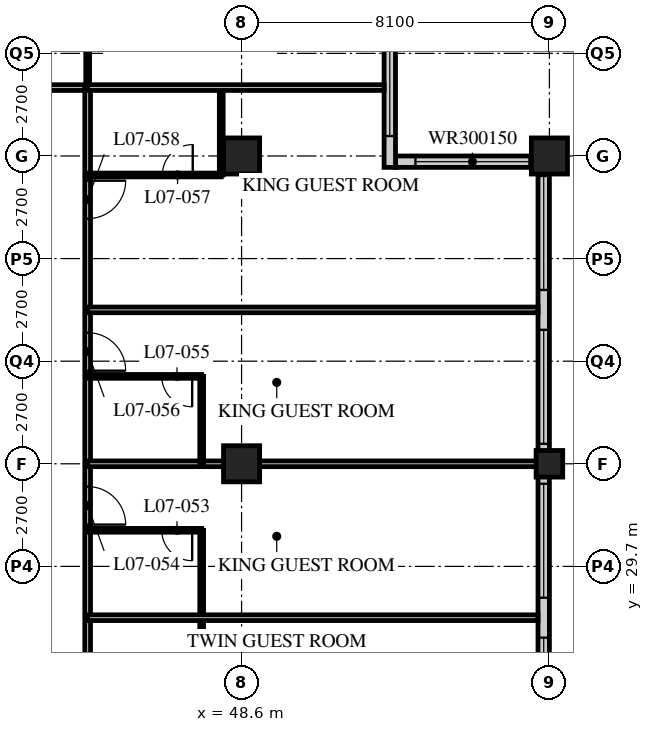
"""IFC4 building model, lengths in metres.
Left out: names, types, materials, properties, quantities, classifications, styles, units other than length and angle.
Written with IfcOpenShell. Run it as: python <this file> out.ifc"""

import sys

from ifc_helpers import new_model, si_unit, direction, frame, frame_2d, origin, origin_2d, place, context, subcontext, project, spatial, rectangle, hollow_rectangle, extrude, element, fill, save


model = new_model("IFC4")
c1 = context("Model", 3, precision=1e-05, world=origin(), true_north=direction((0.0, 1.0)))
c2 = subcontext(c1, "Body", "Model", "MODEL_VIEW")
j1 = project(units=[si_unit("LENGTHUNIT", "METRE"), si_unit("PLANEANGLEUNIT", "RADIAN")], contexts=[c1])
p1 = place(None, origin())
s1 = spatial("IfcSite", under=j1, at=p1, CompositionType="ELEMENT")
p2 = place(p1, origin())
s2 = spatial("IfcBuilding", under=s1, at=p2, CompositionType="ELEMENT")
p3 = place(p2, frame((0.0, 0.0, 36.4)))
s3 = spatial("IfcBuildingStorey", under=s2, at=p3, CompositionType="ELEMENT", Elevation=36.4)
for number, where, z_axis, x_axis in (
    (1, (48.6, 32.4, 0.0), (0.0, 0.0, 1.0), (1.0, 0.0, 0.0)),
    (2, (48.6, 40.5, 0.0), (0.0, 0.0, 1.0), (1.0, 0.0, 0.0)),
):
    element("IfcColumn", number, at=place(p3, frame(where, z_axis=z_axis, x_axis=x_axis)), inside=s3, PredefinedType="COLUMN", context=c2, shape_type="SweptSolid", body=[
        extrude(hollow_rectangle(XDim=0.95, YDim=0.95, WallThickness=0.095, at=origin_2d()), origin(), (0.0, 0.0, 1.0), 3.4),
    ])
p4 = place(p3, frame((56.7, 32.4, 0.0), z_axis=(0.0, 0.0, 1.0), x_axis=(1.0, 0.0, 0.0)))
e3 = element("IfcColumn", 3, at=p4, inside=s3, PredefinedType="COLUMN", context=c2, shape_type="SweptSolid", body=[
    extrude(hollow_rectangle(XDim=0.7, YDim=0.7, WallThickness=0.06, at=origin_2d()), origin(), (0.0, 0.0, 1.0), 3.4),
])
p5 = place(p3, frame((56.7, 40.5, 0.0), z_axis=(0.0, 0.0, 1.0), x_axis=(1.0, 0.0, 0.0)))
e4 = element("IfcColumn", 4, at=p5, inside=s3, PredefinedType="COLUMN", context=c2, shape_type="SweptSolid", body=[
    extrude(hollow_rectangle(XDim=0.95, YDim=0.95, WallThickness=0.095, at=origin_2d()), origin(), (0.0, 0.0, 1.0), 3.4),
])
p6 = place(p3, frame((56.55, 8.4, 0.0), z_axis=(0.0, 0.0, 1.0), x_axis=(0.0, 1.0, 0.0)))
e5 = element("IfcWall", 5, at=p6, inside=s3, PredefinedType="SOLIDWALL", context=c2, shape_type="SweptSolid", body=[
    extrude(rectangle(XDim=32.1, YDim=0.3, at=frame_2d((16.05, 0.0))), origin(), (0.0, 0.0, 1.0), 3.19),
])
p7 = place(p6, frame((0.225, 0.0, 0.9)))
e6 = element("IfcOpeningElement", 6, at=p7, cuts=e5, PredefinedType="OPENING", context=c2, shape_type="SweptSolid", body=[
    extrude(rectangle(XDim=3.0, YDim=2.0, at=frame_2d((1.5, 1.0))), frame((0.0, 0.16, 0.0), z_axis=(0.0, -1.0, 0.0), x_axis=(1.0, 0.0, 0.0)), (0.0, 0.0, 1.0), 0.32),
])
p8 = place(p6, frame((4.275, 0.0, 0.9)))
e7 = element("IfcOpeningElement", 7, at=p8, cuts=e5, PredefinedType="OPENING", context=c2, shape_type="SweptSolid", body=[
    extrude(rectangle(XDim=3.0, YDim=2.0, at=frame_2d((1.5, 1.0))), frame((0.0, 0.16, 0.0), z_axis=(0.0, -1.0, 0.0), x_axis=(1.0, 0.0, 0.0)), (0.0, 0.0, 1.0), 0.32),
])
p9 = place(p6, frame((8.325, 0.0, 0.9)))
e8 = element("IfcOpeningElement", 8, at=p9, cuts=e5, PredefinedType="OPENING", context=c2, shape_type="SweptSolid", body=[
    extrude(rectangle(XDim=3.0, YDim=2.0, at=frame_2d((1.5, 1.0))), frame((0.0, 0.16, 0.0), z_axis=(0.0, -1.0, 0.0), x_axis=(1.0, 0.0, 0.0)), (0.0, 0.0, 1.0), 0.32),
])
p10 = place(p6, frame((12.375, 0.0, 0.9)))
e9 = element("IfcOpeningElement", 9, at=p10, cuts=e5, PredefinedType="OPENING", context=c2, shape_type="SweptSolid", body=[
    extrude(rectangle(XDim=3.0, YDim=2.0, at=frame_2d((1.5, 1.0))), frame((0.0, 0.16, 0.0), z_axis=(0.0, -1.0, 0.0), x_axis=(1.0, 0.0, 0.0)), (0.0, 0.0, 1.0), 0.32),
])
p11 = place(p6, frame((16.425, 0.0, 0.9)))
e10 = element("IfcOpeningElement", 10, at=p11, cuts=e5, PredefinedType="OPENING", context=c2, shape_type="SweptSolid", body=[
    extrude(rectangle(XDim=3.0, YDim=2.0, at=frame_2d((1.5, 1.0))), frame((0.0, 0.16, 0.0), z_axis=(0.0, -1.0, 0.0), x_axis=(1.0, 0.0, 0.0)), (0.0, 0.0, 1.0), 0.32),
])
p12 = place(p6, frame((20.475, 0.0, 0.9)))
e11 = element("IfcOpeningElement", 11, at=p12, cuts=e5, PredefinedType="OPENING", context=c2, shape_type="SweptSolid", body=[
    extrude(rectangle(XDim=3.0, YDim=2.0, at=frame_2d((1.5, 1.0))), frame((0.0, 0.16, 0.0), z_axis=(0.0, -1.0, 0.0), x_axis=(1.0, 0.0, 0.0)), (0.0, 0.0, 1.0), 0.32),
])
p13 = place(p6, frame((24.525, 0.0, 0.9)))
e12 = element("IfcOpeningElement", 12, at=p13, cuts=e5, PredefinedType="OPENING", context=c2, shape_type="SweptSolid", body=[
    extrude(rectangle(XDim=3.0, YDim=2.0, at=frame_2d((1.5, 1.0))), frame((0.0, 0.16, 0.0), z_axis=(0.0, -1.0, 0.0), x_axis=(1.0, 0.0, 0.0)), (0.0, 0.0, 1.0), 0.32),
])
p14 = place(p6, frame((28.575, 0.0, 0.9)))
e13 = element("IfcOpeningElement", 13, at=p14, cuts=e5, PredefinedType="OPENING", context=c2, shape_type="SweptSolid", body=[
    extrude(rectangle(XDim=3.0, YDim=2.0, at=frame_2d((1.5, 1.0))), frame((0.0, 0.16, 0.0), z_axis=(0.0, -1.0, 0.0), x_axis=(1.0, 0.0, 0.0)), (0.0, 0.0, 1.0), 0.32),
])
p15 = place(p3, frame((56.4, 40.35, 0.0), z_axis=(0.0, 0.0, 1.0), x_axis=(-1.0, 0.0, 0.0)))
e14 = element("IfcWall", 14, at=p15, inside=s3, PredefinedType="SOLIDWALL", context=c2, shape_type="SweptSolid", body=[
    extrude(rectangle(XDim=3.75, YDim=0.3, at=frame_2d((1.875, 0.0))), origin(), (0.0, 0.0, 1.0), 3.19),
])
p16 = place(p15, frame((0.225, 0.0, 0.9)))
e15 = element("IfcOpeningElement", 15, at=p16, cuts=e14, PredefinedType="OPENING", context=c2, shape_type="SweptSolid", body=[
    extrude(rectangle(XDim=3.0, YDim=1.5, at=frame_2d((1.5, 0.75))), frame((0.0, 0.16, 0.0), z_axis=(0.0, -1.0, 0.0), x_axis=(1.0, 0.0, 0.0)), (0.0, 0.0, 1.0), 0.32),
])
p17 = place(p3, frame((52.5, 40.2, 0.0), z_axis=(0.0, 0.0, 1.0), x_axis=(0.0, 1.0, 0.0)))
e16 = element("IfcWall", 16, at=p17, inside=s3, PredefinedType="SOLIDWALL", context=c2, shape_type="SweptSolid", body=[
    extrude(rectangle(XDim=4.35, YDim=0.3, at=frame_2d((2.175, 0.0))), origin(), (0.0, 0.0, 1.0), 3.19),
])
p18 = place(p17, frame((0.825, 0.0, 0.9)))
e17 = element("IfcOpeningElement", 17, at=p18, cuts=e16, PredefinedType="OPENING", context=c2, shape_type="SweptSolid", body=[
    extrude(rectangle(XDim=3.0, YDim=1.5, at=frame_2d((1.5, 0.75))), frame((0.0, 0.16, 0.0), z_axis=(0.0, -1.0, 0.0), x_axis=(1.0, 0.0, 0.0)), (0.0, 0.0, 1.0), 0.32),
])
p19 = place(p3, frame((12.15, 42.3, 0.0), z_axis=(0.0, 0.0, 1.0), x_axis=(1.0, 0.0, 0.0)))
e18 = element("IfcWall", 18, at=p19, inside=s3, PredefinedType="PARTITIONING", context=c2, shape_type="SweptSolid", body=[
    extrude(rectangle(XDim=32.4, YDim=0.15, at=frame_2d((16.2, 0.0))), origin(), (0.0, 0.0, 1.0), 3.19),
])
p20 = place(p19, frame((6.5, 0.0, 0.0)))
e19 = element("IfcOpeningElement", 19, at=p20, cuts=e18, PredefinedType="OPENING", context=c2, shape_type="SweptSolid", body=[
    extrude(rectangle(XDim=1.0, YDim=2.1, at=frame_2d((0.5, 1.05))), frame((0.0, 0.085, 0.0), z_axis=(0.0, -1.0, 0.0), x_axis=(1.0, 0.0, 0.0)), (0.0, 0.0, 1.0), 0.17),
])
p21 = place(p19, frame((8.4, 0.0, 0.0)))
e20 = element("IfcOpeningElement", 20, at=p21, cuts=e18, PredefinedType="OPENING", context=c2, shape_type="SweptSolid", body=[
    extrude(rectangle(XDim=1.0, YDim=2.1, at=frame_2d((0.5, 1.05))), frame((0.0, 0.085, 0.0), z_axis=(0.0, -1.0, 0.0), x_axis=(1.0, 0.0, 0.0)), (0.0, 0.0, 1.0), 0.17),
])
p22 = place(p19, frame((14.6, 0.0, 0.0)))
e21 = element("IfcOpeningElement", 21, at=p22, cuts=e18, PredefinedType="OPENING", context=c2, shape_type="SweptSolid", body=[
    extrude(rectangle(XDim=1.0, YDim=2.1, at=frame_2d((0.5, 1.05))), frame((0.0, 0.085, 0.0), z_axis=(0.0, -1.0, 0.0), x_axis=(1.0, 0.0, 0.0)), (0.0, 0.0, 1.0), 0.17),
])
p23 = place(p19, frame((18.65, 0.0, 0.0)))
e22 = element("IfcOpeningElement", 22, at=p23, cuts=e18, PredefinedType="OPENING", context=c2, shape_type="SweptSolid", body=[
    extrude(rectangle(XDim=1.0, YDim=2.1, at=frame_2d((0.5, 1.05))), frame((0.0, 0.085, 0.0), z_axis=(0.0, -1.0, 0.0), x_axis=(1.0, 0.0, 0.0)), (0.0, 0.0, 1.0), 0.17),
])
p24 = place(p19, frame((23.0, 0.0, 0.0)))
e23 = element("IfcOpeningElement", 23, at=p24, cuts=e18, PredefinedType="OPENING", context=c2, shape_type="SweptSolid", body=[
    extrude(rectangle(XDim=1.0, YDim=2.1, at=frame_2d((0.5, 1.05))), frame((0.0, 0.085, 0.0), z_axis=(0.0, -1.0, 0.0), x_axis=(1.0, 0.0, 0.0)), (0.0, 0.0, 1.0), 0.17),
])
p25 = place(p19, frame((26.75, 0.0, 0.0)))
e24 = element("IfcOpeningElement", 24, at=p25, cuts=e18, PredefinedType="OPENING", context=c2, shape_type="SweptSolid", body=[
    extrude(rectangle(XDim=1.0, YDim=2.1, at=frame_2d((0.5, 1.05))), frame((0.0, 0.085, 0.0), z_axis=(0.0, -1.0, 0.0), x_axis=(1.0, 0.0, 0.0)), (0.0, 0.0, 1.0), 0.17),
])
p26 = place(p19, frame((28.775, 0.0, 0.0)))
e25 = element("IfcOpeningElement", 25, at=p26, cuts=e18, PredefinedType="OPENING", context=c2, shape_type="SweptSolid", body=[
    extrude(rectangle(XDim=1.0, YDim=2.1, at=frame_2d((0.5, 1.05))), frame((0.0, 0.085, 0.0), z_axis=(0.0, -1.0, 0.0), x_axis=(1.0, 0.0, 0.0)), (0.0, 0.0, 1.0), 0.17),
])
p27 = place(p19, frame((2.625, 0.0, 0.0)))
e26 = element("IfcOpeningElement", 26, at=p27, cuts=e18, PredefinedType="OPENING", context=c2, shape_type="SweptSolid", body=[
    extrude(rectangle(XDim=1.0, YDim=2.1, at=frame_2d((0.5, 1.05))), frame((0.0, 0.085, 0.0), z_axis=(0.0, -1.0, 0.0), x_axis=(1.0, 0.0, 0.0)), (0.0, 0.0, 1.0), 0.17),
])
p28 = place(p3, frame((44.55, 16.2, 0.0), z_axis=(0.0, 0.0, 1.0), x_axis=(0.0, 1.0, 0.0)))
e27 = element("IfcWall", 27, at=p28, inside=s3, PredefinedType="PARTITIONING", context=c2, shape_type="SweptSolid", body=[
    extrude(rectangle(XDim=26.1, YDim=0.15, at=frame_2d((13.05, 0.0))), origin(), (0.0, 0.0, 1.0), 3.19),
])
p29 = place(p28, frame((2.75, 0.0, 0.0)))
e28 = element("IfcOpeningElement", 28, at=p29, cuts=e27, PredefinedType="OPENING", context=c2, shape_type="SweptSolid", body=[
    extrude(rectangle(XDim=1.0, YDim=2.1, at=frame_2d((0.5, 1.05))), frame((0.0, 0.085, 0.0), z_axis=(0.0, -1.0, 0.0), x_axis=(1.0, 0.0, 0.0)), (0.0, 0.0, 1.0), 0.17),
])
p30 = place(p28, frame((4.35, 0.0, 0.0)))
e29 = element("IfcOpeningElement", 29, at=p30, cuts=e27, PredefinedType="OPENING", context=c2, shape_type="SweptSolid", body=[
    extrude(rectangle(XDim=1.0, YDim=2.1, at=frame_2d((0.5, 1.05))), frame((0.0, 0.085, 0.0), z_axis=(0.0, -1.0, 0.0), x_axis=(1.0, 0.0, 0.0)), (0.0, 0.0, 1.0), 0.17),
])
p31 = place(p28, frame((8.4, 0.0, 0.0)))
e30 = element("IfcOpeningElement", 30, at=p31, cuts=e27, PredefinedType="OPENING", context=c2, shape_type="SweptSolid", body=[
    extrude(rectangle(XDim=1.0, YDim=2.1, at=frame_2d((0.5, 1.05))), frame((0.0, 0.085, 0.0), z_axis=(0.0, -1.0, 0.0), x_axis=(1.0, 0.0, 0.0)), (0.0, 0.0, 1.0), 0.17),
])
p32 = place(p28, frame((14.6, 0.0, 0.0)))
e31 = element("IfcOpeningElement", 31, at=p32, cuts=e27, PredefinedType="OPENING", context=c2, shape_type="SweptSolid", body=[
    extrude(rectangle(XDim=1.0, YDim=2.1, at=frame_2d((0.5, 1.05))), frame((0.0, 0.085, 0.0), z_axis=(0.0, -1.0, 0.0), x_axis=(1.0, 0.0, 0.0)), (0.0, 0.0, 1.0), 0.17),
])
p33 = place(p28, frame((18.65, 0.0, 0.0)))
e32 = element("IfcOpeningElement", 32, at=p33, cuts=e27, PredefinedType="OPENING", context=c2, shape_type="SweptSolid", body=[
    extrude(rectangle(XDim=1.0, YDim=2.1, at=frame_2d((0.5, 1.05))), frame((0.0, 0.085, 0.0), z_axis=(0.0, -1.0, 0.0), x_axis=(1.0, 0.0, 0.0)), (0.0, 0.0, 1.0), 0.17),
])
p34 = place(p28, frame((22.65, 0.0, 0.0)))
e33 = element("IfcOpeningElement", 33, at=p34, cuts=e27, PredefinedType="OPENING", context=c2, shape_type="SweptSolid", body=[
    extrude(rectangle(XDim=1.0, YDim=2.1, at=frame_2d((0.5, 1.05))), frame((0.0, 0.085, 0.0), z_axis=(0.0, -1.0, 0.0), x_axis=(1.0, 0.0, 0.0)), (0.0, 0.0, 1.0), 0.17),
])
p35 = place(p3, frame((47.55, 25.75, 0.0), z_axis=(0.0, 0.0, 1.0), x_axis=(0.0, 1.0, 0.0)))
e34 = element("IfcWall", 34, at=p35, inside=s3, PredefinedType="PARTITIONING", context=c2, shape_type="SweptSolid", body=[
    extrude(rectangle(XDim=4.9, YDim=0.1, at=frame_2d((2.45, 0.0))), origin(), (0.0, 0.0, 1.0), 3.19),
])
p36 = place(p3, frame((44.55, 28.35, 0.0), z_axis=(0.0, 0.0, 1.0), x_axis=(1.0, 0.0, 0.0)))
e35 = element("IfcWall", 35, at=p36, inside=s3, PredefinedType="PARTITIONING", context=c2, shape_type="SweptSolid", body=[
    extrude(rectangle(XDim=11.85, YDim=0.15, at=frame_2d((5.925, 0.0))), origin(), (0.0, 0.0, 1.0), 3.19),
])
p37 = place(p3, frame((44.55, 30.65, 0.0), z_axis=(0.0, 0.0, 1.0), x_axis=(1.0, 0.0, 0.0)))
e36 = element("IfcWall", 36, at=p37, inside=s3, PredefinedType="PARTITIONING", context=c2, shape_type="SweptSolid", body=[
    extrude(rectangle(XDim=3.0, YDim=0.1, at=frame_2d((1.5, 0.0))), origin(), (0.0, 0.0, 1.0), 3.19),
])
p38 = place(p37, frame((1.95, 0.0, 0.0)))
e37 = element("IfcOpeningElement", 37, at=p38, cuts=e36, PredefinedType="OPENING", context=c2, shape_type="SweptSolid", body=[
    extrude(rectangle(XDim=0.8, YDim=2.1, at=frame_2d((0.4, 1.05))), frame((0.0, 0.06, 0.0), z_axis=(0.0, -1.0, 0.0), x_axis=(1.0, 0.0, 0.0)), (0.0, 0.0, 1.0), 0.12),
])
p39 = place(p3, frame((44.55, 32.4, 0.0), z_axis=(0.0, 0.0, 1.0), x_axis=(1.0, 0.0, 0.0)))
e38 = element("IfcWall", 38, at=p39, inside=s3, PredefinedType="PARTITIONING", context=c2, shape_type="SweptSolid", body=[
    extrude(rectangle(XDim=11.85, YDim=0.15, at=frame_2d((5.925, 0.0))), origin(), (0.0, 0.0, 1.0), 2.578),
])
p40 = place(p3, frame((47.55, 32.4, 0.0), z_axis=(0.0, 0.0, 1.0), x_axis=(0.0, 1.0, 0.0)))
e39 = element("IfcWall", 39, at=p40, inside=s3, PredefinedType="PARTITIONING", context=c2, shape_type="SweptSolid", body=[
    extrude(rectangle(XDim=2.3, YDim=0.1, at=frame_2d((1.15, 0.0))), origin(), (0.0, 0.0, 1.0), 3.19),
])
p41 = place(p3, frame((44.55, 34.7, 0.0), z_axis=(0.0, 0.0, 1.0), x_axis=(1.0, 0.0, 0.0)))
e40 = element("IfcWall", 40, at=p41, inside=s3, PredefinedType="PARTITIONING", context=c2, shape_type="SweptSolid", body=[
    extrude(rectangle(XDim=3.0, YDim=0.1, at=frame_2d((1.5, 0.0))), origin(), (0.0, 0.0, 1.0), 3.19),
])
p42 = place(p41, frame((1.95, 0.0, 0.0)))
e41 = element("IfcOpeningElement", 41, at=p42, cuts=e40, PredefinedType="OPENING", context=c2, shape_type="SweptSolid", body=[
    extrude(rectangle(XDim=0.8, YDim=2.1, at=frame_2d((0.4, 1.05))), frame((0.0, 0.06, 0.0), z_axis=(0.0, -1.0, 0.0), x_axis=(1.0, 0.0, 0.0)), (0.0, 0.0, 1.0), 0.12),
])
p43 = place(p3, frame((44.55, 36.45, 0.0), z_axis=(0.0, 0.0, 1.0), x_axis=(1.0, 0.0, 0.0)))
e42 = element("IfcWall", 42, at=p43, inside=s3, PredefinedType="PARTITIONING", context=c2, shape_type="SweptSolid", body=[
    extrude(rectangle(XDim=11.85, YDim=0.15, at=frame_2d((5.925, 0.0))), origin(), (0.0, 0.0, 1.0), 3.19),
])
p44 = place(p3, frame((48.065, 40.0, 0.0), z_axis=(0.0, 0.0, 1.0), x_axis=(0.0, 1.0, 0.0)))
e43 = element("IfcWall", 43, at=p44, inside=s3, PredefinedType="PARTITIONING", context=c2, shape_type="SweptSolid", body=[
    extrude(rectangle(XDim=2.3, YDim=0.1, at=frame_2d((1.15, 0.0))), origin(), (0.0, 0.0, 1.0), 3.19),
])
p45 = place(p3, frame((44.55, 40.0, 0.0), z_axis=(0.0, 0.0, 1.0), x_axis=(1.0, 0.0, 0.0)))
e44 = element("IfcWall", 44, at=p45, inside=s3, PredefinedType="PARTITIONING", context=c2, shape_type="SweptSolid", body=[
    extrude(rectangle(XDim=3.515, YDim=0.1, at=frame_2d((1.757, 0.0))), origin(), (0.0, 0.0, 1.0), 3.19),
])
p46 = place(p45, frame((1.965, 0.0, 0.0)))
e45 = element("IfcOpeningElement", 45, at=p46, cuts=e44, PredefinedType="OPENING", context=c2, shape_type="SweptSolid", body=[
    extrude(rectangle(XDim=0.8, YDim=2.1, at=frame_2d((0.4, 1.05))), frame((0.0, 0.06, 0.0), z_axis=(0.0, -1.0, 0.0), x_axis=(1.0, 0.0, 0.0)), (0.0, 0.0, 1.0), 0.12),
])
p47 = place(p3, frame((44.55, 42.3, 0.0), z_axis=(0.0, 0.0, 1.0), x_axis=(0.0, 1.0, 0.0)))
e46 = element("IfcWall", 46, at=p47, inside=s3, PredefinedType="PARTITIONING", context=c2, shape_type="SweptSolid", body=[
    extrude(rectangle(XDim=2.4, YDim=0.1, at=frame_2d((1.2, 0.0))), origin(), (0.0, 0.0, 1.0), 3.19),
])
p48 = place(p3, frame((44.55, 42.3, 0.0), z_axis=(0.0, 0.0, 1.0), x_axis=(1.0, 0.0, 0.0)))
e47 = element("IfcWall", 47, at=p48, inside=s3, PredefinedType="PARTITIONING", context=c2, shape_type="SweptSolid", body=[
    extrude(rectangle(XDim=7.8, YDim=0.15, at=frame_2d((3.9, 0.0))), origin(), (0.0, 0.0, 1.0), 3.19),
])
p49 = place(p11, origin())
e48 = element("IfcWindow", 48, at=p49, inside=s3, PartitioningType="SINGLE_PANEL", PredefinedType="WINDOW", context=c2, shape_type="SweptSolid", body=[
    extrude(rectangle(XDim=3.0, YDim=2.0, at=frame_2d((1.5, 1.0))), frame((0.0, 0.03, 0.0), z_axis=(0.0, -1.0, 0.0), x_axis=(1.0, 0.0, 0.0)), (0.0, 0.0, 1.0), 0.06),
])
fill(e10, e48)
p50 = place(p12, origin())
e49 = element("IfcWindow", 49, at=p50, inside=s3, PartitioningType="SINGLE_PANEL", PredefinedType="WINDOW", context=c2, shape_type="SweptSolid", body=[
    extrude(rectangle(XDim=3.0, YDim=2.0, at=frame_2d((1.5, 1.0))), frame((0.0, 0.03, 0.0), z_axis=(0.0, -1.0, 0.0), x_axis=(1.0, 0.0, 0.0)), (0.0, 0.0, 1.0), 0.06),
])
fill(e11, e49)
p51 = place(p13, origin())
e50 = element("IfcWindow", 50, at=p51, inside=s3, PartitioningType="SINGLE_PANEL", PredefinedType="WINDOW", context=c2, shape_type="SweptSolid", body=[
    extrude(rectangle(XDim=3.0, YDim=2.0, at=frame_2d((1.5, 1.0))), frame((0.0, 0.03, 0.0), z_axis=(0.0, -1.0, 0.0), x_axis=(1.0, 0.0, 0.0)), (0.0, 0.0, 1.0), 0.06),
])
fill(e12, e50)
p52 = place(p14, origin())
e51 = element("IfcWindow", 51, at=p52, inside=s3, PartitioningType="SINGLE_PANEL", PredefinedType="WINDOW", context=c2, shape_type="SweptSolid", body=[
    extrude(rectangle(XDim=3.0, YDim=2.0, at=frame_2d((1.5, 1.0))), frame((0.0, 0.03, 0.0), z_axis=(0.0, -1.0, 0.0), x_axis=(1.0, 0.0, 0.0)), (0.0, 0.0, 1.0), 0.06),
])
fill(e13, e51)
p53 = place(p16, origin())
e52 = element("IfcWindow", 52, at=p53, inside=s3, PartitioningType="SINGLE_PANEL", PredefinedType="WINDOW", context=c2, shape_type="SweptSolid", body=[
    extrude(rectangle(XDim=3.0, YDim=1.5, at=frame_2d((1.5, 0.75))), frame((0.0, 0.03, 0.0), z_axis=(0.0, -1.0, 0.0), x_axis=(1.0, 0.0, 0.0)), (0.0, 0.0, 1.0), 0.06),
])
fill(e15, e52)
p54 = place(p18, origin())
e53 = element("IfcWindow", 53, at=p54, inside=s3, PartitioningType="SINGLE_PANEL", PredefinedType="WINDOW", context=c2, shape_type="SweptSolid", body=[
    extrude(rectangle(XDim=3.0, YDim=1.5, at=frame_2d((1.5, 0.75))), frame((0.0, 0.03, 0.0), z_axis=(0.0, -1.0, 0.0), x_axis=(1.0, 0.0, 0.0)), (0.0, 0.0, 1.0), 0.06),
])
fill(e17, e53)
p55 = place(p38, origin())
e54 = element("IfcDoor", 54, at=p55, inside=s3, OperationType="SINGLE_SWING_LEFT", PredefinedType="DOOR", context=c2, shape_type="SweptSolid", body=[
    extrude(rectangle(XDim=0.8, YDim=2.1, at=frame_2d((0.4, 1.05))), frame((0.0, 0.025, 0.0), z_axis=(0.0, -1.0, 0.0), x_axis=(1.0, 0.0, 0.0)), (0.0, 0.0, 1.0), 0.05),
])
fill(e37, e54)
p56 = place(p32, origin())
e55 = element("IfcDoor", 55, at=p56, inside=s3, OperationType="SINGLE_SWING_RIGHT", PredefinedType="DOOR", context=c2, shape_type="SweptSolid", body=[
    extrude(rectangle(XDim=1.0, YDim=2.1, at=frame_2d((0.5, 1.05))), frame((0.0, 0.025, 0.0), z_axis=(0.0, -1.0, 0.0), x_axis=(1.0, 0.0, 0.0)), (0.0, 0.0, 1.0), 0.05),
])
fill(e31, e55)
p57 = place(p42, origin())
e56 = element("IfcDoor", 56, at=p57, inside=s3, OperationType="SINGLE_SWING_LEFT", PredefinedType="DOOR", context=c2, shape_type="SweptSolid", body=[
    extrude(rectangle(XDim=0.8, YDim=2.1, at=frame_2d((0.4, 1.05))), frame((0.0, 0.025, 0.0), z_axis=(0.0, -1.0, 0.0), x_axis=(1.0, 0.0, 0.0)), (0.0, 0.0, 1.0), 0.05),
])
fill(e41, e56)
p58 = place(p33, origin())
e57 = element("IfcDoor", 57, at=p58, inside=s3, OperationType="SINGLE_SWING_RIGHT", PredefinedType="DOOR", context=c2, shape_type="SweptSolid", body=[
    extrude(rectangle(XDim=1.0, YDim=2.1, at=frame_2d((0.5, 1.05))), frame((0.0, 0.025, 0.0), z_axis=(0.0, -1.0, 0.0), x_axis=(1.0, 0.0, 0.0)), (0.0, 0.0, 1.0), 0.05),
])
fill(e32, e57)
p59 = place(p46, origin())
e58 = element("IfcDoor", 58, at=p59, inside=s3, OperationType="SINGLE_SWING_RIGHT", PredefinedType="DOOR", context=c2, shape_type="SweptSolid", body=[
    extrude(rectangle(XDim=0.8, YDim=2.1, at=frame_2d((0.4, 1.05))), frame((0.0, 0.025, 0.0), z_axis=(0.0, -1.0, 0.0), x_axis=(1.0, 0.0, 0.0)), (0.0, 0.0, 1.0), 0.05),
])
fill(e45, e58)
p60 = place(p34, origin())
e59 = element("IfcDoor", 59, at=p60, inside=s3, OperationType="SINGLE_SWING_LEFT", PredefinedType="DOOR", context=c2, shape_type="SweptSolid", body=[
    extrude(rectangle(XDim=1.0, YDim=2.1, at=frame_2d((0.5, 1.05))), frame((0.0, 0.025, 0.0), z_axis=(0.0, -1.0, 0.0), x_axis=(1.0, 0.0, 0.0)), (0.0, 0.0, 1.0), 0.05),
])
fill(e33, e59)
save(model, sys.argv[1])
